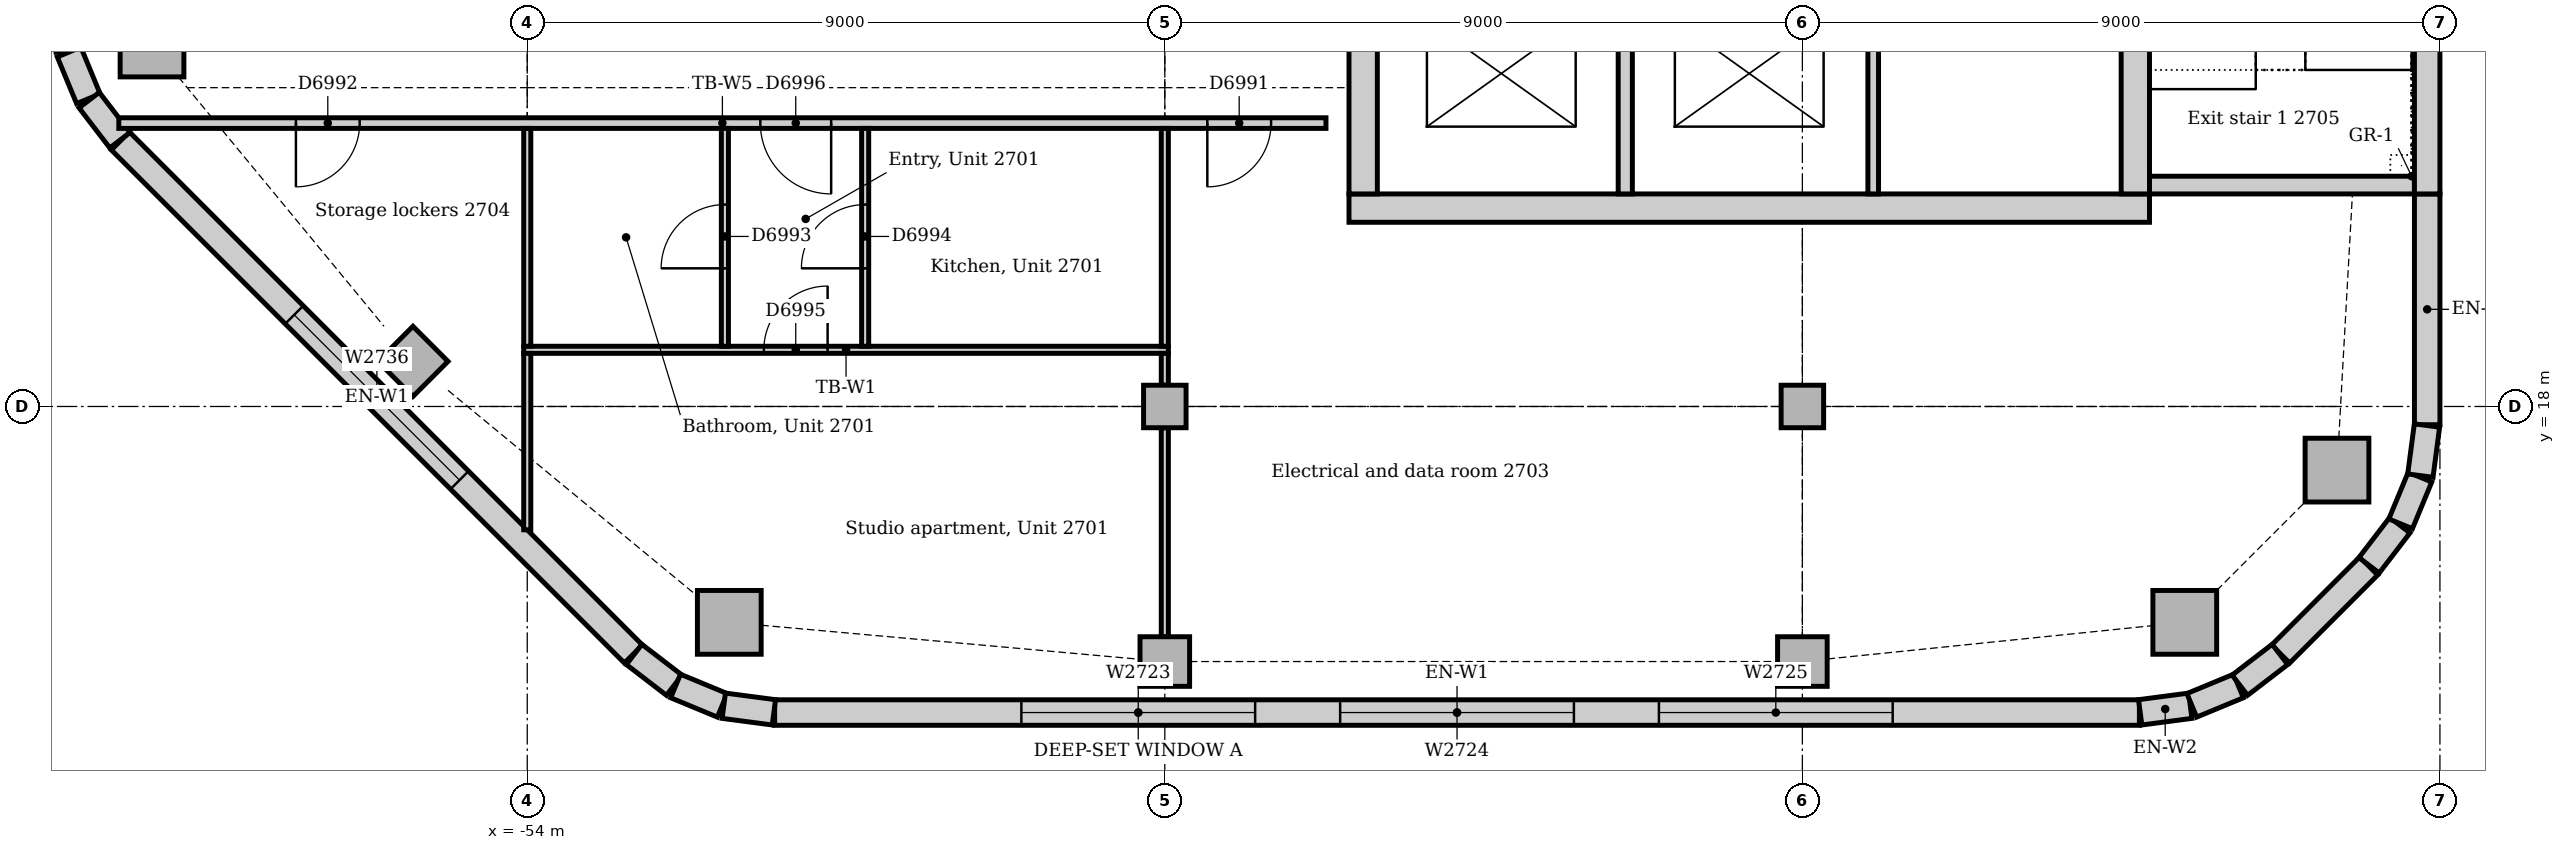
"""IFC4 building model, lengths in metres.
Left out: names, types, materials, properties, quantities, classifications, styles, units other than length and angle.
Written with IfcOpenShell. Run it as: python <this file> out.ifc"""

import sys

from ifc_helpers import new_model, si_unit, direction, frame, frame_2d, origin, origin_2d, place, context, subcontext, project, spatial, rectangle, extrude, element, fill, save


model = new_model("IFC4")
c1 = context("Model", 3, precision=1e-05, world=origin(), true_north=direction((0.0, 1.0)))
c2 = subcontext(c1, "Body", "Model", "MODEL_VIEW")
j1 = project(units=[si_unit("LENGTHUNIT", "METRE"), si_unit("PLANEANGLEUNIT", "RADIAN")], contexts=[c1])
p1 = place(None, origin())
s1 = spatial("IfcSite", under=j1, at=p1, CompositionType="ELEMENT")
p2 = place(p1, origin())
s2 = spatial("IfcBuilding", under=s1, at=p2, CompositionType="ELEMENT")
p3 = place(p2, frame((0.0, 0.0, 116.0)))
s3 = spatial("IfcBuildingStorey", under=s2, at=p3, CompositionType="ELEMENT", Elevation=116.0)
p4 = place(p3, frame((-42.4, 20.8, 0.0), z_axis=(0.0, 0.0, 1.0), x_axis=(1.0, 0.0, 0.0)))
e1 = element("IfcWall", 1, at=p4, inside=s3, PredefinedType="SOLIDWALL", context=c2, shape_type="SweptSolid", body=[
    extrude(rectangle(XDim=11.3, YDim=0.4, at=frame_2d((5.65, 0.0))), origin(), (0.0, 0.0, 1.0), 4.0),
])
p5 = place(p3, frame((-31.3, 21.0, 0.0), z_axis=(0.0, 0.0, 1.0), x_axis=(0.0, 1.0, 0.0)))
e2 = element("IfcWall", 2, at=p5, inside=s3, PredefinedType="SOLIDWALL", context=c2, shape_type="SweptSolid", body=[
    extrude(rectangle(XDim=9.5, YDim=0.4, at=frame_2d((4.75, 0.0))), origin(), (0.0, 0.0, 1.0), 4.0),
])
p6 = place(p5, frame((5.25, 0.0, 0.0)))
e3 = element("IfcOpeningElement", 3, at=p6, cuts=e2, PredefinedType="OPENING", context=c2, shape_type="SweptSolid", body=[
    extrude(rectangle(XDim=1.0, YDim=2.1, at=frame_2d((0.5, 1.05))), frame((0.0, 0.21, 0.0), z_axis=(0.0, -1.0, 0.0), x_axis=(1.0, 0.0, 0.0)), (0.0, 0.0, 1.0), 0.42),
])
p7 = place(p3, frame((-42.2, 30.5, 0.0), z_axis=(0.0, 0.0, 1.0), x_axis=(0.0, -1.0, 0.0)))
e4 = element("IfcWall", 4, at=p7, inside=s3, PredefinedType="SOLIDWALL", context=c2, shape_type="SweptSolid", body=[
    extrude(rectangle(XDim=9.5, YDim=0.4, at=frame_2d((4.75, 0.0))), origin(), (0.0, 0.0, 1.0), 4.0),
])
p8 = place(p7, frame((3.85, 0.0, 0.0)))
e5 = element("IfcOpeningElement", 5, at=p8, cuts=e4, PredefinedType="OPENING", context=c2, shape_type="SweptSolid", body=[
    extrude(rectangle(XDim=1.8, YDim=2.1, at=frame_2d((0.9, 1.05))), frame((0.0, 0.21, 0.0), z_axis=(0.0, -1.0, 0.0), x_axis=(1.0, 0.0, 0.0)), (0.0, 0.0, 1.0), 0.42),
])
p9 = place(p3, frame((-31.1, 21.125, 0.0), z_axis=(0.0, 0.0, 1.0), x_axis=(1.0, 0.0, 0.0)))
e6 = element("IfcWall", 6, at=p9, inside=s3, PredefinedType="SOLIDWALL", context=c2, shape_type="SweptSolid", body=[
    extrude(rectangle(XDim=3.74, YDim=0.25, at=frame_2d((1.87, 0.0))), origin(), (0.0, 0.0, 1.0), 4.0),
])
for number, where, z_axis, x_axis in (
    (7, (-51.148, 14.953, 0.0), (0.0, 0.0, 1.0), (1.0, 0.0, 0.0)),
    (8, (-30.602, 14.953, 0.0), (0.0, 0.0, 1.0), (1.0, 0.0, 0.0)),
    (9, (-28.453, 17.102, 0.0), (0.0, 0.0, 1.0), (1.0, 0.0, 0.0)),
    (10, (-59.297, 23.102, 0.0), (0.0, 0.0, 1.0), (1.0, 0.0, 0.0)),
):
    element("IfcColumn", number, at=place(p3, frame(where, z_axis=z_axis, x_axis=x_axis)), inside=s3, PredefinedType="COLUMN", context=c2, shape_type="SweptSolid", body=[
        extrude(rectangle(XDim=0.9, YDim=0.9, at=origin_2d()), origin(), (0.0, 0.0, 1.0), 3.85),
    ])
for number, where, z_axis, x_axis in (
    (11, (-45.0, 14.4, 0.0), (0.0, 0.0, 1.0), (1.0, 0.0, 0.0)),
    (12, (-36.0, 14.4, 0.0), (0.0, 0.0, 1.0), (1.0, 0.0, 0.0)),
    (13, (-55.614, 18.636, 0.0), (0.0, 0.0, 1.0), (0.707, 0.707, 0.0)),
):
    element("IfcColumn", number, at=place(p3, frame(where, z_axis=z_axis, x_axis=x_axis)), inside=s3, PredefinedType="COLUMN", context=c2, shape_type="SweptSolid", body=[
        extrude(rectangle(XDim=0.7, YDim=0.7, at=origin_2d()), origin(), (0.0, 0.0, 1.0), 3.85),
    ])
for number, where, z_axis, x_axis in (
    (14, (-45.0, 18.0, 0.0), (0.0, 0.0, 1.0), (1.0, 0.0, 0.0)),
    (15, (-36.0, 18.0, 0.0), (0.0, 0.0, 1.0), (1.0, 0.0, 0.0)),
):
    element("IfcColumn", number, at=place(p3, frame(where, z_axis=z_axis, x_axis=x_axis)), inside=s3, PredefinedType="COLUMN", context=c2, shape_type="SweptSolid", body=[
        extrude(rectangle(XDim=0.6, YDim=0.6, at=origin_2d()), origin(), (0.0, 0.0, 1.0), 3.85),
    ])
p10 = place(p3, frame((-50.507, 13.68, 0.0), z_axis=(0.0, 0.0, 1.0), x_axis=(1.0, 0.0, 0.0)))
e16 = element("IfcWall", 16, at=p10, inside=s3, PredefinedType="STANDARD", context=c2, shape_type="SweptSolid", body=[
    extrude(rectangle(XDim=19.265, YDim=0.36, at=frame_2d((9.632, 0.0))), origin(), (0.0, 0.0, 1.0), 3.85),
])
p11 = place(p10, frame((3.482, 0.0, 0.9)))
e17 = element("IfcOpeningElement", 17, at=p11, cuts=e16, PredefinedType="OPENING", context=c2, shape_type="SweptSolid", body=[
    extrude(rectangle(XDim=3.3, YDim=1.6, at=frame_2d((1.65, 0.8))), frame((0.0, 0.19, 0.0), z_axis=(0.0, -1.0, 0.0), x_axis=(1.0, 0.0, 0.0)), (0.0, 0.0, 1.0), 0.38),
])
p12 = place(p10, frame((7.982, 0.0, 0.9)))
e18 = element("IfcOpeningElement", 18, at=p12, cuts=e16, PredefinedType="OPENING", context=c2, shape_type="SweptSolid", body=[
    extrude(rectangle(XDim=3.3, YDim=1.6, at=frame_2d((1.65, 0.8))), frame((0.0, 0.19, 0.0), z_axis=(0.0, -1.0, 0.0), x_axis=(1.0, 0.0, 0.0)), (0.0, 0.0, 1.0), 0.38),
])
p13 = place(p10, frame((12.482, 0.0, 0.9)))
e19 = element("IfcOpeningElement", 19, at=p13, cuts=e16, PredefinedType="OPENING", context=c2, shape_type="SweptSolid", body=[
    extrude(rectangle(XDim=3.3, YDim=1.6, at=frame_2d((1.65, 0.8))), frame((0.0, 0.19, 0.0), z_axis=(0.0, -1.0, 0.0), x_axis=(1.0, 0.0, 0.0)), (0.0, 0.0, 1.0), 0.38),
])
p14 = place(p3, frame((-29.249, 14.506, 0.0), z_axis=(0.0, 0.0, 1.0), x_axis=(0.707106781187, 0.707106781187, 0.0)))
e20 = element("IfcWall", 20, at=p14, inside=s3, PredefinedType="STANDARD", context=c2, shape_type="SweptSolid", body=[
    extrude(rectangle(XDim=1.757, YDim=0.36, at=frame_2d((0.879, 0.0))), origin(), (0.0, 0.0, 1.0), 3.85),
])
p15 = place(p3, frame((-27.18, 17.743, 0.0), z_axis=(0.0, 0.0, 1.0), x_axis=(0.0, 1.0, 0.0)))
e21 = element("IfcWall", 21, at=p15, inside=s3, PredefinedType="STANDARD", context=c2, shape_type="SweptSolid", body=[
    extrude(rectangle(XDim=3.257, YDim=0.36, at=frame_2d((1.629, 0.0))), origin(), (0.0, 0.0, 1.0), 3.85),
])
p16 = place(p3, frame((-27.18, 21.0, 0.0), z_axis=(0.0, 0.0, 1.0), x_axis=(0.0, 1.0, 0.0)))
e22 = element("IfcWall", 22, at=p16, inside=s3, PredefinedType="STANDARD", context=c2, shape_type="SweptSolid", body=[
    extrude(rectangle(XDim=6.75, YDim=0.36, at=frame_2d((3.375, 0.0))), origin(), (0.0, 0.0, 1.0), 3.85),
])
p17 = place(p3, frame((-59.744, 21.749, 0.0), z_axis=(0.0, 0.0, 1.0), x_axis=(0.707106781187, -0.707106781187, 0.0)))
e23 = element("IfcWall", 23, at=p17, inside=s3, PredefinedType="STANDARD", context=c2, shape_type="SweptSolid", body=[
    extrude(rectangle(XDim=10.243, YDim=0.36, at=frame_2d((5.121, 0.0))), origin(), (0.0, 0.0, 1.0), 3.85),
])
p18 = place(p17, frame((3.471, 0.0, 0.9)))
e24 = element("IfcOpeningElement", 24, at=p18, cuts=e23, PredefinedType="OPENING", context=c2, shape_type="SweptSolid", body=[
    extrude(rectangle(XDim=3.3, YDim=1.6, at=frame_2d((1.65, 0.8))), frame((0.0, 0.19, 0.0), z_axis=(0.0, -1.0, 0.0), x_axis=(1.0, 0.0, 0.0)), (0.0, 0.0, 1.0), 0.38),
])
for number, where, z_axis, x_axis in (
    (25, (-31.231, 13.683, 0.0), (0.0, 0.0, 1.0), (0.991, 0.131, 0.0)),
    (26, (-30.503, 13.782, 0.0), (0.0, 0.0, 1.0), (0.924, 0.383, 0.0)),
):
    element("IfcWall", number, at=place(p3, frame(where, z_axis=z_axis, x_axis=x_axis)), inside=s3, PredefinedType="STANDARD", context=c2, shape_type="SweptSolid", body=[
        extrude(rectangle(XDim=0.713, YDim=0.36, at=frame_2d((0.356, 0.0))), origin(), (0.0, 0.0, 1.0), 3.85),
    ])
for number, where, z_axis, x_axis in (
    (27, (-29.825, 14.066, 0.0), (0.0, 0.0, 1.0), (0.793, 0.609, 0.0)),
    (28, (-28.0, 15.759, 0.0), (0.0, 0.0, 1.0), (0.609, 0.793, 0.0)),
):
    element("IfcWall", number, at=place(p3, frame(where, z_axis=z_axis, x_axis=x_axis)), inside=s3, PredefinedType="STANDARD", context=c2, shape_type="SweptSolid", body=[
        extrude(rectangle(XDim=0.713, YDim=0.36, at=frame_2d((0.357, 0.0))), origin(), (0.0, 0.0, 1.0), 3.85),
    ])
for number, where, z_axis, x_axis in (
    (29, (-27.555, 16.344, 0.0), (0.0, 0.0, 1.0), (0.383, 0.924, 0.0)),
    (30, (-27.276, 17.024, 0.0), (0.0, 0.0, 1.0), (0.131, 0.991, 0.0)),
    (31, (-60.468, 23.003, 0.0), (0.0, 0.0, 1.0), (0.383, -0.924, 0.0)),
):
    element("IfcWall", number, at=place(p3, frame(where, z_axis=z_axis, x_axis=x_axis)), inside=s3, PredefinedType="STANDARD", context=c2, shape_type="SweptSolid", body=[
        extrude(rectangle(XDim=0.713, YDim=0.36, at=frame_2d((0.356, 0.0))), origin(), (0.0, 0.0, 1.0), 3.85),
    ])
for number, where, z_axis, x_axis in (
    (32, (-60.184, 22.325, 0.0), (0.0, 0.0, 1.0), (0.609, -0.793, 0.0)),
    (33, (-52.491, 14.5, 0.0), (0.0, 0.0, 1.0), (0.793, -0.609, 0.0)),
):
    element("IfcWall", number, at=place(p3, frame(where, z_axis=z_axis, x_axis=x_axis)), inside=s3, PredefinedType="STANDARD", context=c2, shape_type="SweptSolid", body=[
        extrude(rectangle(XDim=0.713, YDim=0.36, at=frame_2d((0.357, 0.0))), origin(), (0.0, 0.0, 1.0), 3.85),
    ])
for number, where, z_axis, x_axis in (
    (34, (-51.906, 14.055, 0.0), (0.0, 0.0, 1.0), (0.924, -0.383, 0.0)),
    (35, (-51.226, 13.776, 0.0), (0.0, 0.0, 1.0), (0.991, -0.131, 0.0)),
):
    element("IfcWall", number, at=place(p3, frame(where, z_axis=z_axis, x_axis=x_axis)), inside=s3, PredefinedType="STANDARD", context=c2, shape_type="SweptSolid", body=[
        extrude(rectangle(XDim=0.713, YDim=0.36, at=frame_2d((0.356, 0.0))), origin(), (0.0, 0.0, 1.0), 3.85),
    ])
p19 = place(p3, frame((-38.5, 21.0, 0.0), z_axis=(0.0, 0.0, 1.0), x_axis=(0.0, 1.0, 0.0)))
e36 = element("IfcWall", 36, at=p19, inside=s3, PredefinedType="SOLIDWALL", context=c2, shape_type="SweptSolid", body=[
    extrude(rectangle(XDim=3.1, YDim=0.2, at=frame_2d((1.55, 0.0))), origin(), (0.0, 0.0, 1.0), 4.0),
])
p20 = place(p3, frame((-35.0, 21.0, 0.0), z_axis=(0.0, 0.0, 1.0), x_axis=(0.0, 1.0, 0.0)))
e37 = element("IfcWall", 37, at=p20, inside=s3, PredefinedType="SOLIDWALL", context=c2, shape_type="SweptSolid", body=[
    extrude(rectangle(XDim=2.9, YDim=0.15, at=frame_2d((1.45, 0.0))), origin(), (0.0, 0.0, 1.0), 4.0),
])
p21 = place(p3, frame((-59.766, 22.0, 0.0), z_axis=(0.0, 0.0, 1.0), x_axis=(1.0, 0.0, 0.0)))
e38 = element("IfcWall", 38, at=p21, inside=s3, PredefinedType="PARTITIONING", context=c2, shape_type="SweptSolid", body=[
    extrude(rectangle(XDim=17.041, YDim=0.15, at=frame_2d((8.52, 0.0))), origin(), (0.0, 0.0, 1.0), 3.85),
])
p22 = place(p21, frame((15.366, 0.0, 0.0)))
e39 = element("IfcOpeningElement", 39, at=p22, cuts=e38, PredefinedType="OPENING", context=c2, shape_type="SweptSolid", body=[
    extrude(rectangle(XDim=0.9, YDim=2.1, at=frame_2d((0.45, 1.05))), frame((0.0, 0.085, 0.0), z_axis=(0.0, -1.0, 0.0), x_axis=(1.0, 0.0, 0.0)), (0.0, 0.0, 1.0), 0.17),
])
p23 = place(p21, frame((2.5, 0.0, 0.0)))
e40 = element("IfcOpeningElement", 40, at=p23, cuts=e38, PredefinedType="OPENING", context=c2, shape_type="SweptSolid", body=[
    extrude(rectangle(XDim=0.9, YDim=2.1, at=frame_2d((0.45, 1.05))), frame((0.0, 0.085, 0.0), z_axis=(0.0, -1.0, 0.0), x_axis=(1.0, 0.0, 0.0)), (0.0, 0.0, 1.0), 0.17),
])
p24 = place(p21, frame((9.056, 0.0, 0.0)))
e41 = element("IfcOpeningElement", 41, at=p24, cuts=e38, PredefinedType="OPENING", context=c2, shape_type="SweptSolid", body=[
    extrude(rectangle(XDim=1.0, YDim=2.1, at=frame_2d((0.5, 1.05))), frame((0.0, 0.085, 0.0), z_axis=(0.0, -1.0, 0.0), x_axis=(1.0, 0.0, 0.0)), (0.0, 0.0, 1.0), 0.17),
])
p25 = place(p3, frame((-54.05, 18.8, 0.0), z_axis=(0.0, 0.0, 1.0), x_axis=(1.0, 0.0, 0.0)))
e42 = element("IfcWall", 42, at=p25, inside=s3, PredefinedType="PARTITIONING", context=c2, shape_type="SweptSolid", body=[
    extrude(rectangle(XDim=9.1, YDim=0.1, at=frame_2d((4.55, 0.0))), origin(), (0.0, 0.0, 1.0), 3.85),
])
p26 = place(p25, frame((3.39, 0.0, 0.0)))
e43 = element("IfcOpeningElement", 43, at=p26, cuts=e42, PredefinedType="OPENING", context=c2, shape_type="SweptSolid", body=[
    extrude(rectangle(XDim=0.9, YDim=2.1, at=frame_2d((0.45, 1.05))), frame((0.0, 0.06, 0.0), z_axis=(0.0, -1.0, 0.0), x_axis=(1.0, 0.0, 0.0)), (0.0, 0.0, 1.0), 0.12),
])
p27 = place(p3, frame((-45.0, 18.85, 0.0), z_axis=(0.0, 0.0, 1.0), x_axis=(0.0, 1.0, 0.0)))
e44 = element("IfcWall", 44, at=p27, inside=s3, PredefinedType="PARTITIONING", context=c2, shape_type="SweptSolid", body=[
    extrude(rectangle(XDim=3.075, YDim=0.1, at=frame_2d((1.538, 0.0))), origin(), (0.0, 0.0, 1.0), 3.362),
])
p28 = place(p3, frame((-45.0, 18.3, 0.0), z_axis=(0.0, 0.0, 1.0), x_axis=(0.0, 1.0, 0.0)))
e45 = element("IfcWall", 45, at=p28, inside=s3, PredefinedType="PARTITIONING", context=c2, shape_type="SweptSolid", body=[
    extrude(rectangle(XDim=0.45, YDim=0.1, at=frame_2d((0.225, 0.0))), origin(), (0.0, 0.0, 1.0), 3.85),
])
p29 = place(p3, frame((-45.0, 14.75, 0.0), z_axis=(0.0, 0.0, 1.0), x_axis=(0.0, 1.0, 0.0)))
e46 = element("IfcWall", 46, at=p29, inside=s3, PredefinedType="PARTITIONING", context=c2, shape_type="SweptSolid", body=[
    extrude(rectangle(XDim=2.95, YDim=0.1, at=frame_2d((1.475, 0.0))), origin(), (0.0, 0.0, 1.0), 3.652),
])
p30 = place(p3, frame((-54.0, 18.85, 0.0), z_axis=(0.0, 0.0, 1.0), x_axis=(0.0, 1.0, 0.0)))
e47 = element("IfcWall", 47, at=p30, inside=s3, PredefinedType="PARTITIONING", context=c2, shape_type="SweptSolid", body=[
    extrude(rectangle(XDim=3.075, YDim=0.1, at=frame_2d((1.538, 0.0))), origin(), (0.0, 0.0, 1.0), 3.362),
])
p31 = place(p3, frame((-54.0, 16.259, 0.0), z_axis=(0.0, 0.0, 1.0), x_axis=(0.0, 1.0, 0.0)))
e48 = element("IfcWall", 48, at=p31, inside=s3, PredefinedType="PARTITIONING", context=c2, shape_type="SweptSolid", body=[
    extrude(rectangle(XDim=2.491, YDim=0.1, at=frame_2d((1.245, 0.0))), origin(), (0.0, 0.0, 1.0), 3.362),
])
p32 = place(p3, frame((-51.21, 18.85, 0.0), z_axis=(0.0, 0.0, 1.0), x_axis=(0.0, 1.0, 0.0)))
e49 = element("IfcWall", 49, at=p32, inside=s3, PredefinedType="PARTITIONING", context=c2, shape_type="SweptSolid", body=[
    extrude(rectangle(XDim=3.075, YDim=0.1, at=frame_2d((1.538, 0.0))), origin(), (0.0, 0.0, 1.0), 3.85),
])
p33 = place(p32, frame((1.1, 0.0, 0.0)))
e50 = element("IfcOpeningElement", 50, at=p33, cuts=e49, PredefinedType="OPENING", context=c2, shape_type="SweptSolid", body=[
    extrude(rectangle(XDim=0.9, YDim=2.1, at=frame_2d((0.45, 1.05))), frame((0.0, 0.06, 0.0), z_axis=(0.0, -1.0, 0.0), x_axis=(1.0, 0.0, 0.0)), (0.0, 0.0, 1.0), 0.12),
])
p34 = place(p3, frame((-49.23, 18.85, 0.0), z_axis=(0.0, 0.0, 1.0), x_axis=(0.0, 1.0, 0.0)))
e51 = element("IfcWall", 51, at=p34, inside=s3, PredefinedType="PARTITIONING", context=c2, shape_type="SweptSolid", body=[
    extrude(rectangle(XDim=3.075, YDim=0.1, at=frame_2d((1.538, 0.0))), origin(), (0.0, 0.0, 1.0), 3.85),
])
p35 = place(p34, frame((1.1, 0.0, 0.0)))
e52 = element("IfcOpeningElement", 52, at=p35, cuts=e51, PredefinedType="OPENING", context=c2, shape_type="SweptSolid", body=[
    extrude(rectangle(XDim=0.9, YDim=2.1, at=frame_2d((0.45, 1.05))), frame((0.0, 0.06, 0.0), z_axis=(0.0, -1.0, 0.0), x_axis=(1.0, 0.0, 0.0)), (0.0, 0.0, 1.0), 0.12),
])
p36 = place(p11, origin())
e53 = element("IfcWindow", 53, at=p36, inside=s3, PartitioningType="SINGLE_PANEL", PredefinedType="WINDOW", context=c2, shape_type="SweptSolid", body=[
    extrude(rectangle(XDim=3.3, YDim=1.6, at=frame_2d((1.65, 0.8))), frame((0.0, 0.13, 0.0), z_axis=(0.0, -1.0, 0.0), x_axis=(1.0, 0.0, 0.0)), (0.0, 0.0, 1.0), 0.06),
])
fill(e17, e53)
p37 = place(p12, origin())
e54 = element("IfcWindow", 54, at=p37, inside=s3, PartitioningType="SINGLE_PANEL", PredefinedType="WINDOW", context=c2, shape_type="SweptSolid", body=[
    extrude(rectangle(XDim=3.3, YDim=1.6, at=frame_2d((1.65, 0.8))), frame((0.0, 0.13, 0.0), z_axis=(0.0, -1.0, 0.0), x_axis=(1.0, 0.0, 0.0)), (0.0, 0.0, 1.0), 0.06),
])
fill(e18, e54)
p38 = place(p13, origin())
e55 = element("IfcWindow", 55, at=p38, inside=s3, PartitioningType="SINGLE_PANEL", PredefinedType="WINDOW", context=c2, shape_type="SweptSolid", body=[
    extrude(rectangle(XDim=3.3, YDim=1.6, at=frame_2d((1.65, 0.8))), frame((0.0, 0.13, 0.0), z_axis=(0.0, -1.0, 0.0), x_axis=(1.0, 0.0, 0.0)), (0.0, 0.0, 1.0), 0.06),
])
fill(e19, e55)
p39 = place(p18, origin())
e56 = element("IfcWindow", 56, at=p39, inside=s3, PartitioningType="SINGLE_PANEL", PredefinedType="WINDOW", context=c2, shape_type="SweptSolid", body=[
    extrude(rectangle(XDim=3.3, YDim=1.6, at=frame_2d((1.65, 0.8))), frame((0.0, 0.13, 0.0), z_axis=(0.0, -1.0, 0.0), x_axis=(1.0, 0.0, 0.0)), (0.0, 0.0, 1.0), 0.06),
])
fill(e24, e56)
p40 = place(p22, frame((0.9, 0.0, 0.0), z_axis=(0.0, 0.0, 1.0), x_axis=(-1.0, 0.0, 0.0)))
e57 = element("IfcDoor", 57, at=p40, inside=s3, OperationType="SINGLE_SWING_RIGHT", PredefinedType="DOOR", context=c2, shape_type="SweptSolid", body=[
    extrude(rectangle(XDim=0.9, YDim=2.1, at=frame_2d((0.45, 1.05))), frame((0.0, 0.025, 0.0), z_axis=(0.0, -1.0, 0.0), x_axis=(1.0, 0.0, 0.0)), (0.0, 0.0, 1.0), 0.05),
])
fill(e39, e57)
p41 = place(p23, frame((0.9, 0.0, 0.0), z_axis=(0.0, 0.0, 1.0), x_axis=(-1.0, 0.0, 0.0)))
e58 = element("IfcDoor", 58, at=p41, inside=s3, OperationType="SINGLE_SWING_RIGHT", PredefinedType="DOOR", context=c2, shape_type="SweptSolid", body=[
    extrude(rectangle(XDim=0.9, YDim=2.1, at=frame_2d((0.45, 1.05))), frame((0.0, 0.025, 0.0), z_axis=(0.0, -1.0, 0.0), x_axis=(1.0, 0.0, 0.0)), (0.0, 0.0, 1.0), 0.05),
])
fill(e40, e58)
p42 = place(p33, origin())
e59 = element("IfcDoor", 59, at=p42, inside=s3, OperationType="SINGLE_SWING_LEFT", PredefinedType="DOOR", context=c2, shape_type="SweptSolid", body=[
    extrude(rectangle(XDim=0.9, YDim=2.1, at=frame_2d((0.45, 1.05))), frame((0.0, 0.025, 0.0), z_axis=(0.0, -1.0, 0.0), x_axis=(1.0, 0.0, 0.0)), (0.0, 0.0, 1.0), 0.05),
])
fill(e50, e59)
p43 = place(p35, origin())
e60 = element("IfcDoor", 60, at=p43, inside=s3, OperationType="SINGLE_SWING_LEFT", PredefinedType="DOOR", context=c2, shape_type="SweptSolid", body=[
    extrude(rectangle(XDim=0.9, YDim=2.1, at=frame_2d((0.45, 1.05))), frame((0.0, 0.025, 0.0), z_axis=(0.0, -1.0, 0.0), x_axis=(1.0, 0.0, 0.0)), (0.0, 0.0, 1.0), 0.05),
])
fill(e52, e60)
p44 = place(p26, origin())
e61 = element("IfcDoor", 61, at=p44, inside=s3, OperationType="SINGLE_SWING_RIGHT", PredefinedType="DOOR", context=c2, shape_type="SweptSolid", body=[
    extrude(rectangle(XDim=0.9, YDim=2.1, at=frame_2d((0.45, 1.05))), frame((0.0, 0.025, 0.0), z_axis=(0.0, -1.0, 0.0), x_axis=(1.0, 0.0, 0.0)), (0.0, 0.0, 1.0), 0.05),
])
fill(e43, e61)
p45 = place(p24, frame((1.0, 0.0, 0.0), z_axis=(0.0, 0.0, 1.0), x_axis=(-1.0, 0.0, 0.0)))
e62 = element("IfcDoor", 62, at=p45, inside=s3, OperationType="SINGLE_SWING_LEFT", PredefinedType="DOOR", context=c2, shape_type="SweptSolid", body=[
    extrude(rectangle(XDim=1.0, YDim=2.1, at=frame_2d((0.5, 1.05))), frame((0.0, 0.025, 0.0), z_axis=(0.0, -1.0, 0.0), x_axis=(1.0, 0.0, 0.0)), (0.0, 0.0, 1.0), 0.05),
])
fill(e41, e62)
save(model, sys.argv[1])
